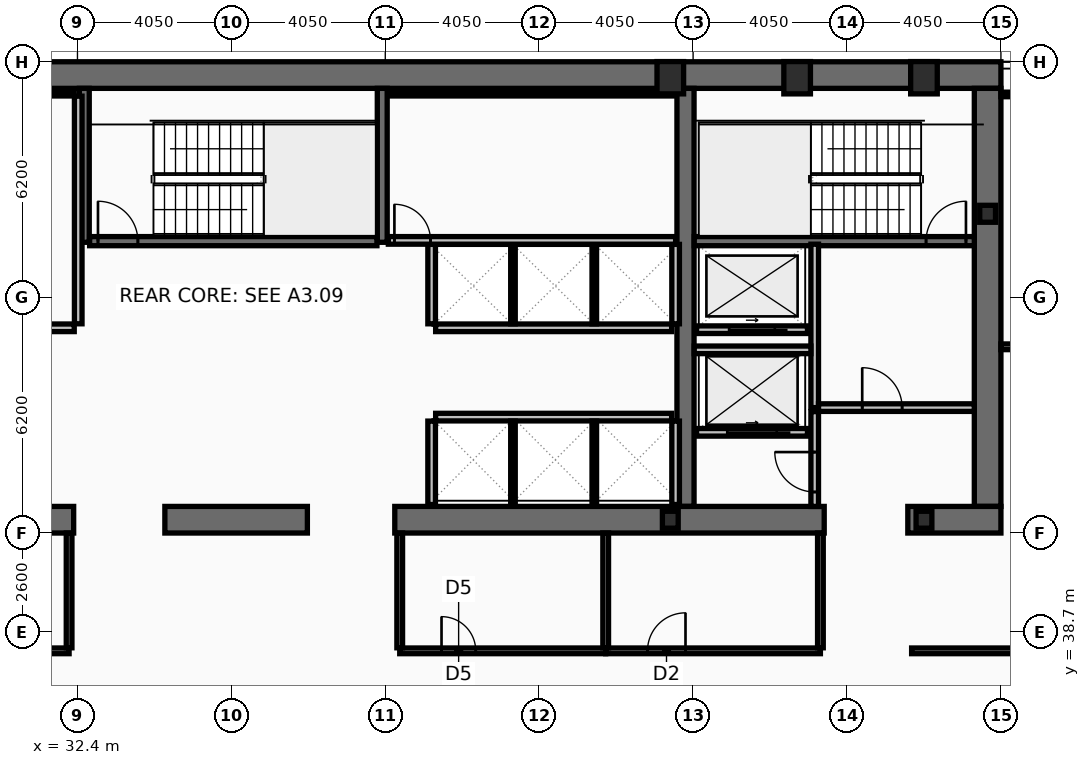
"""IFC4 building model, lengths in metres.
Left out: names, types, materials, properties, quantities, classifications, styles, units other than length and angle.
Written with IfcOpenShell. Run it as: python <this file> out.ifc"""

import sys

from ifc_helpers import new_model, si_unit, direction, frame, frame_2d, origin, origin_2d, place, context, subcontext, project, spatial, rectangle, hollow_rectangle, i_section, extrude, element, fill, save


model = new_model("IFC4")
c1 = context("Model", 3, precision=1e-05, world=origin(), true_north=direction((0.0, 1.0)))
c2 = subcontext(c1, "Body", "Model", "MODEL_VIEW")
j1 = project(units=[si_unit("LENGTHUNIT", "METRE"), si_unit("PLANEANGLEUNIT", "RADIAN")], contexts=[c1])
p1 = place(None, origin())
s1 = spatial("IfcSite", under=j1, at=p1, CompositionType="ELEMENT")
p2 = place(p1, origin())
s2 = spatial("IfcBuilding", under=s1, at=p2, CompositionType="ELEMENT")
p3 = place(p2, frame((0.0, 0.0, 161.4)))
s3 = spatial("IfcBuildingStorey", under=s2, at=p3, CompositionType="ELEMENT", Elevation=161.4)
p4 = place(p3, frame((16.2, 53.35, 0.0), z_axis=(0.0, 0.0, 1.0), x_axis=(1.0, 0.0, 0.0)))
e1 = element("IfcWall", 1, at=p4, inside=s3, PredefinedType="SHEAR", context=c2, shape_type="SweptSolid", body=[
    extrude(rectangle(XDim=40.5, YDim=0.7, at=frame_2d((20.25, 0.0))), origin(), (0.0, 0.0, 1.0), 3.44),
])
p5 = place(p3, frame((56.35, 53.0, 0.0), z_axis=(0.0, 0.0, 1.0), x_axis=(0.0, -1.0, 0.0)))
e2 = element("IfcWall", 2, at=p5, inside=s3, PredefinedType="SHEAR", context=c2, shape_type="SweptSolid", body=[
    extrude(rectangle(XDim=11.0, YDim=0.7, at=frame_2d((5.5, 0.0))), origin(), (0.0, 0.0, 1.0), 3.44),
])
p6 = place(p3, frame((48.4, 42.0, 0.0), z_axis=(0.0, 0.0, 1.0), x_axis=(0.0, 1.0, 0.0)))
e3 = element("IfcWall", 3, at=p6, inside=s3, PredefinedType="SHEAR", context=c2, shape_type="SweptSolid", body=[
    extrude(rectangle(XDim=11.0, YDim=0.45, at=frame_2d((5.5, 0.0))), origin(), (0.0, 0.0, 1.0), 3.44),
])
p7 = place(p3, frame((32.3, 41.65, 0.0), z_axis=(0.0, 0.0, 1.0), x_axis=(-1.0, 0.0, 0.0)))
e4 = element("IfcWall", 4, at=p7, inside=s3, PredefinedType="SHEAR", context=c2, shape_type="SweptSolid", body=[
    extrude(rectangle(XDim=11.45, YDim=0.7, at=frame_2d((5.725, 0.0))), origin(), (0.0, 0.0, 1.0), 3.44),
])
p8 = place(p3, frame((38.45, 41.65, 0.0), z_axis=(0.0, 0.0, 1.0), x_axis=(-1.0, 0.0, 0.0)))
e5 = element("IfcWall", 5, at=p8, inside=s3, PredefinedType="SHEAR", context=c2, shape_type="SweptSolid", body=[
    extrude(rectangle(XDim=3.75, YDim=0.7, at=frame_2d((1.875, 0.0))), origin(), (0.0, 0.0, 1.0), 3.44),
])
p9 = place(p3, frame((52.05, 41.65, 0.0), z_axis=(0.0, 0.0, 1.0), x_axis=(-1.0, 0.0, 0.0)))
e6 = element("IfcWall", 6, at=p9, inside=s3, PredefinedType="SHEAR", context=c2, shape_type="SweptSolid", body=[
    extrude(rectangle(XDim=11.3, YDim=0.7, at=frame_2d((5.65, 0.0))), origin(), (0.0, 0.0, 1.0), 3.44),
])
p10 = place(p3, frame((56.7, 41.65, 0.0), z_axis=(0.0, 0.0, 1.0), x_axis=(-1.0, 0.0, 0.0)))
e7 = element("IfcWall", 7, at=p10, inside=s3, PredefinedType="SHEAR", context=c2, shape_type="SweptSolid", body=[
    extrude(rectangle(XDim=2.45, YDim=0.7, at=frame_2d((1.225, 0.0))), origin(), (0.0, 0.0, 1.0), 3.44),
])
for number, where, z_axis, x_axis in (
    (8, (32.58, 48.95, 0.0), (0.0, 0.0, 1.0), (0.0, 1.0, 0.0)),
    (9, (40.42, 48.95, 0.0), (0.0, 0.0, 1.0), (0.0, 1.0, 0.0)),
):
    element("IfcWall", number, at=place(p3, frame(where, z_axis=z_axis, x_axis=x_axis)), inside=s3, PredefinedType="SHEAR", context=c2, shape_type="SweptSolid", body=[
        extrude(rectangle(XDim=4.05, YDim=0.26, at=frame_2d((2.025, 0.0))), origin(), (0.0, 0.0, 1.0), 3.44),
    ])
p11 = place(p3, frame((48.63, 48.98, 0.0), z_axis=(0.0, 0.0, 1.0), x_axis=(1.0, 0.0, 0.0)))
e10 = element("IfcWall", 10, at=p11, inside=s3, PredefinedType="SHEAR", context=c2, shape_type="SweptSolid", body=[
    extrude(rectangle(XDim=7.37, YDim=0.24, at=frame_2d((3.685, 0.0))), origin(), (0.0, 0.0, 1.0), 3.44),
])
p12 = place(p11, frame((6.1, 0.0, 0.0)))
e11 = element("IfcOpeningElement", 11, at=p12, cuts=e10, PredefinedType="OPENING", context=c2, shape_type="SweptSolid", body=[
    extrude(rectangle(XDim=1.05, YDim=2.15, at=frame_2d((0.525, 1.075))), frame((0.0, 0.13, 0.0), z_axis=(0.0, -1.0, 0.0), x_axis=(1.0, 0.0, 0.0)), (0.0, 0.0, 1.0), 0.26),
])
p13 = place(p3, frame((32.72, 48.98, 0.0), z_axis=(0.0, 0.0, 1.0), x_axis=(1.0, 0.0, 0.0)))
e12 = element("IfcWall", 12, at=p13, inside=s3, PredefinedType="SHEAR", context=c2, shape_type="SweptSolid", body=[
    extrude(rectangle(XDim=7.56, YDim=0.24, at=frame_2d((3.78, 0.0))), origin(), (0.0, 0.0, 1.0), 3.44),
])
p14 = place(p13, frame((0.22, 0.0, 0.0)))
e13 = element("IfcOpeningElement", 13, at=p14, cuts=e12, PredefinedType="OPENING", context=c2, shape_type="SweptSolid", body=[
    extrude(rectangle(XDim=1.05, YDim=2.15, at=frame_2d((0.525, 1.075))), frame((0.0, 0.13, 0.0), z_axis=(0.0, -1.0, 0.0), x_axis=(1.0, 0.0, 0.0)), (0.0, 0.0, 1.0), 0.26),
])
for number, where, z_axis, x_axis in (
    (14, (48.0, 53.28, 0.0), (0.0, 0.0, 1.0), (1.0, 0.0, 0.0)),
    (15, (51.337, 53.28, 0.0), (0.0, 0.0, 1.0), (1.0, 0.0, 0.0)),
    (16, (54.675, 53.28, 0.0), (0.0, 0.0, 1.0), (1.0, 0.0, 0.0)),
):
    element("IfcColumn", number, at=place(p3, frame(where, z_axis=z_axis, x_axis=x_axis)), inside=s3, PredefinedType="COLUMN", context=c2, shape_type="SweptSolid", body=[
        extrude(hollow_rectangle(XDim=0.7, YDim=0.85, WallThickness=0.05, at=origin_2d()), origin(), (0.0, 0.0, 1.0), 3.6),
    ])
for number, where, z_axis, x_axis in (
    (17, (56.35, 49.7, 0.0), (0.0, 0.0, 1.0), (1.0, 0.0, 0.0)),
    (18, (48.0, 41.65, 0.0), (0.0, 0.0, 1.0), (1.0, 0.0, 0.0)),
    (19, (54.675, 41.65, 0.0), (0.0, 0.0, 1.0), (1.0, 0.0, 0.0)),
):
    element("IfcColumn", number, at=place(p3, frame(where, z_axis=z_axis, x_axis=x_axis)), inside=s3, PredefinedType="COLUMN", context=c2, shape_type="SweptSolid", body=[
        extrude(i_section(OverallWidth=0.416, OverallDepth=0.446, WebThickness=0.039, FlangeThickness=0.063, at=origin_2d()), origin(), (0.0, 0.0, 1.0), 3.6),
    ])
p15 = place(p3, frame((51.61, 43.95, 0.0), z_axis=(0.0, 0.0, 1.0), x_axis=(-1.0, 0.0, 0.0)))
e20 = element("IfcWall", 20, at=p15, inside=s3, PredefinedType="PARTITIONING", context=c2, shape_type="SweptSolid", body=[
    extrude(rectangle(XDim=2.92, YDim=0.2, at=frame_2d((1.46, 0.0))), origin(), (0.0, 0.0, 1.0), 3.44),
])
p16 = place(p15, frame((0.81, 0.0, 0.0)))
e21 = element("IfcOpeningElement", 21, at=p16, cuts=e20, PredefinedType="OPENING", context=c2, shape_type="SweptSolid", body=[
    extrude(rectangle(XDim=1.3, YDim=2.18, at=frame_2d((0.65, 1.09))), frame((0.0, 0.11, 0.0), z_axis=(0.0, -1.0, 0.0), x_axis=(1.0, 0.0, 0.0)), (0.0, 0.0, 1.0), 0.22),
])
p17 = place(p3, frame((51.61, 46.65, 0.0), z_axis=(0.0, 0.0, 1.0), x_axis=(-1.0, 0.0, 0.0)))
e22 = element("IfcWall", 22, at=p17, inside=s3, PredefinedType="PARTITIONING", context=c2, shape_type="SweptSolid", body=[
    extrude(rectangle(XDim=2.92, YDim=0.2, at=frame_2d((1.46, 0.0))), origin(), (0.0, 0.0, 1.0), 3.44),
])
p18 = place(p17, frame((0.86, 0.0, 0.0)))
e23 = element("IfcOpeningElement", 23, at=p18, cuts=e22, PredefinedType="OPENING", context=c2, shape_type="SweptSolid", body=[
    extrude(rectangle(XDim=1.2, YDim=2.18, at=frame_2d((0.6, 1.09))), frame((0.0, 0.11, 0.0), z_axis=(0.0, -1.0, 0.0), x_axis=(1.0, 0.0, 0.0)), (0.0, 0.0, 1.0), 0.22),
])
p19 = place(p3, frame((51.8, 44.6, 0.0), z_axis=(0.0, 0.0, 1.0), x_axis=(0.0, 1.0, 0.0)))
e24 = element("IfcWall", 24, at=p19, inside=s3, PredefinedType="PARTITIONING", context=c2, shape_type="SweptSolid", body=[
    extrude(rectangle(XDim=4.3, YDim=0.2, at=frame_2d((2.15, 0.0))), origin(), (0.0, 0.0, 1.0), 3.44),
])
p20 = place(p3, frame((51.9, 44.6, 0.0), z_axis=(0.0, 0.0, 1.0), x_axis=(1.0, 0.0, 0.0)))
e25 = element("IfcWall", 25, at=p20, inside=s3, PredefinedType="PARTITIONING", context=c2, shape_type="SweptSolid", body=[
    extrude(rectangle(XDim=4.1, YDim=0.2, at=frame_2d((2.05, 0.0))), origin(), (0.0, 0.0, 1.0), 3.44),
])
p21 = place(p20, frame((1.15, 0.0, 0.0)))
e26 = element("IfcOpeningElement", 26, at=p21, cuts=e25, PredefinedType="OPENING", context=c2, shape_type="SweptSolid", body=[
    extrude(rectangle(XDim=1.05, YDim=2.15, at=frame_2d((0.525, 1.075))), frame((0.0, 0.11, 0.0), z_axis=(0.0, -1.0, 0.0), x_axis=(1.0, 0.0, 0.0)), (0.0, 0.0, 1.0), 0.22),
])
p22 = place(p3, frame((48.63, 46.12, 0.0), z_axis=(0.0, 0.0, 1.0), x_axis=(1.0, 0.0, 0.0)))
e27 = element("IfcWall", 27, at=p22, inside=s3, PredefinedType="PARTITIONING", context=c2, shape_type="SweptSolid", body=[
    extrude(rectangle(XDim=3.07, YDim=0.2, at=frame_2d((1.535, 0.0))), origin(), (0.0, 0.0, 1.0), 3.44),
])
p23 = place(p3, frame((51.8, 42.0, 0.0), z_axis=(0.0, 0.0, 1.0), x_axis=(0.0, 1.0, 0.0)))
e28 = element("IfcWall", 28, at=p23, inside=s3, PredefinedType="PARTITIONING", context=c2, shape_type="SweptSolid", body=[
    extrude(rectangle(XDim=2.495, YDim=0.2, at=frame_2d((1.248, 0.0))), origin(), (0.0, 0.0, 1.0), 3.44),
])
p24 = place(p23, frame((0.38, 0.0, 0.0)))
e29 = element("IfcOpeningElement", 29, at=p24, cuts=e28, PredefinedType="OPENING", context=c2, shape_type="SweptSolid", body=[
    extrude(rectangle(XDim=1.05, YDim=2.15, at=frame_2d((0.525, 1.075))), frame((0.0, 0.11, 0.0), z_axis=(0.0, -1.0, 0.0), x_axis=(1.0, 0.0, 0.0)), (0.0, 0.0, 1.0), 0.22),
])
p25 = place(p3, frame((32.42, 46.805, 0.0), z_axis=(0.0, 0.0, 1.0), x_axis=(0.0, 1.0, 0.0)))
e30 = element("IfcWall", 30, at=p25, inside=s3, PredefinedType="PARTITIONING", context=c2, shape_type="SweptSolid", body=[
    extrude(rectangle(XDim=5.99, YDim=0.2, at=frame_2d((2.995, 0.0))), origin(), (0.0, 0.0, 1.0), 3.44),
])
p26 = place(p3, frame((24.805, 52.86, 0.0), z_axis=(0.0, 0.0, 1.0), x_axis=(1.0, 0.0, 0.0)))
e31 = element("IfcWall", 31, at=p26, inside=s3, PredefinedType="PARTITIONING", context=c2, shape_type="SweptSolid", body=[
    extrude(rectangle(XDim=7.51, YDim=0.12, at=frame_2d((3.755, 0.0))), origin(), (0.0, 0.0, 1.0), 3.44),
])
p27 = place(p3, frame((24.805, 46.7, 0.0), z_axis=(0.0, 0.0, 1.0), x_axis=(1.0, 0.0, 0.0)))
e32 = element("IfcWall", 32, at=p27, inside=s3, PredefinedType="PARTITIONING", context=c2, shape_type="SweptSolid", body=[
    extrude(rectangle(XDim=7.51, YDim=0.2, at=frame_2d((3.755, 0.0))), origin(), (0.0, 0.0, 1.0), 3.44),
])
p28 = place(p27, frame((0.55, 0.0, 0.0)))
e33 = element("IfcOpeningElement", 33, at=p28, cuts=e32, PredefinedType="OPENING", context=c2, shape_type="SweptSolid", body=[
    extrude(rectangle(XDim=0.95, YDim=2.1, at=frame_2d((0.475, 1.05))), frame((0.0, 0.11, 0.0), z_axis=(0.0, -1.0, 0.0), x_axis=(1.0, 0.0, 0.0)), (0.0, 0.0, 1.0), 0.22),
])
p29 = place(p27, frame((3.784, 0.0, 0.0)))
e34 = element("IfcOpeningElement", 34, at=p29, cuts=e32, PredefinedType="OPENING", context=c2, shape_type="SweptSolid", body=[
    extrude(rectangle(XDim=0.95, YDim=2.1, at=frame_2d((0.475, 1.05))), frame((0.0, 0.11, 0.0), z_axis=(0.0, -1.0, 0.0), x_axis=(1.0, 0.0, 0.0)), (0.0, 0.0, 1.0), 0.22),
])
p30 = place(p3, frame((41.825, 46.7, 0.0), z_axis=(0.0, 0.0, 1.0), x_axis=(1.0, 0.0, 0.0)))
e35 = element("IfcWall", 35, at=p30, inside=s3, PredefinedType="PARTITIONING", context=c2, shape_type="SweptSolid", body=[
    extrude(rectangle(XDim=6.21, YDim=0.2, at=frame_2d((3.105, 0.0))), origin(), (0.0, 0.0, 1.0), 3.44),
])
for number, where, z_axis, x_axis in (
    (36, (41.72, 46.805, 0.0), (0.0, 0.0, 1.0), (0.0, 1.0, 0.0)),
    (37, (48.14, 46.805, 0.0), (0.0, 0.0, 1.0), (0.0, 1.0, 0.0)),
):
    element("IfcWall", number, at=place(p3, frame(where, z_axis=z_axis, x_axis=x_axis)), inside=s3, PredefinedType="PARTITIONING", context=c2, shape_type="SweptSolid", body=[
        extrude(rectangle(XDim=2.09, YDim=0.2, at=frame_2d((1.045, 0.0))), origin(), (0.0, 0.0, 1.0), 3.44),
    ])
for number, where, z_axis, x_axis in (
    (38, (43.86, 46.805, 0.0), (0.0, 0.0, 1.0), (0.0, 1.0, 0.0)),
    (39, (46.0, 46.805, 0.0), (0.0, 0.0, 1.0), (0.0, 1.0, 0.0)),
):
    element("IfcWall", number, at=place(p3, frame(where, z_axis=z_axis, x_axis=x_axis)), inside=s3, PredefinedType="PARTITIONING", context=c2, shape_type="SweptSolid", body=[
        extrude(rectangle(XDim=2.09, YDim=0.12, at=frame_2d((1.045, 0.0))), origin(), (0.0, 0.0, 1.0), 3.44),
    ])
p31 = place(p3, frame((41.825, 44.35, 0.0), z_axis=(0.0, 0.0, 1.0), x_axis=(1.0, 0.0, 0.0)))
e40 = element("IfcWall", 40, at=p31, inside=s3, PredefinedType="PARTITIONING", context=c2, shape_type="SweptSolid", body=[
    extrude(rectangle(XDim=6.21, YDim=0.2, at=frame_2d((3.105, 0.0))), origin(), (0.0, 0.0, 1.0), 3.44),
])
for number, where, z_axis, x_axis in (
    (41, (41.72, 42.05, 0.0), (0.0, 0.0, 1.0), (0.0, 1.0, 0.0)),
    (42, (48.14, 42.05, 0.0), (0.0, 0.0, 1.0), (0.0, 1.0, 0.0)),
):
    element("IfcWall", number, at=place(p3, frame(where, z_axis=z_axis, x_axis=x_axis)), inside=s3, PredefinedType="PARTITIONING", context=c2, shape_type="SweptSolid", body=[
        extrude(rectangle(XDim=2.195, YDim=0.2, at=frame_2d((1.098, 0.0))), origin(), (0.0, 0.0, 1.0), 3.44),
    ])
for number, where, z_axis, x_axis in (
    (43, (43.86, 42.05, 0.0), (0.0, 0.0, 1.0), (0.0, 1.0, 0.0)),
    (44, (46.0, 42.05, 0.0), (0.0, 0.0, 1.0), (0.0, 1.0, 0.0)),
):
    element("IfcWall", number, at=place(p3, frame(where, z_axis=z_axis, x_axis=x_axis)), inside=s3, PredefinedType="PARTITIONING", context=c2, shape_type="SweptSolid", body=[
        extrude(rectangle(XDim=2.195, YDim=0.12, at=frame_2d((1.098, 0.0))), origin(), (0.0, 0.0, 1.0), 3.44),
    ])
p32 = place(p3, frame((40.58, 52.86, 0.0), z_axis=(0.0, 0.0, 1.0), x_axis=(1.0, 0.0, 0.0)))
e45 = element("IfcWall", 45, at=p32, inside=s3, PredefinedType="PARTITIONING", context=c2, shape_type="SweptSolid", body=[
    extrude(rectangle(XDim=7.56, YDim=0.12, at=frame_2d((3.78, 0.0))), origin(), (0.0, 0.0, 1.0), 3.44),
])
p33 = place(p3, frame((40.58, 49.0, 0.0), z_axis=(0.0, 0.0, 1.0), x_axis=(1.0, 0.0, 0.0)))
e46 = element("IfcWall", 46, at=p33, inside=s3, PredefinedType="PARTITIONING", context=c2, shape_type="SweptSolid", body=[
    extrude(rectangle(XDim=7.56, YDim=0.2, at=frame_2d((3.78, 0.0))), origin(), (0.0, 0.0, 1.0), 3.44),
])
p34 = place(p33, frame((0.16, 0.0, 0.0)))
e47 = element("IfcOpeningElement", 47, at=p34, cuts=e46, PredefinedType="OPENING", context=c2, shape_type="SweptSolid", body=[
    extrude(rectangle(XDim=0.95, YDim=2.1, at=frame_2d((0.475, 1.05))), frame((0.0, 0.11, 0.0), z_axis=(0.0, -1.0, 0.0), x_axis=(1.0, 0.0, 0.0)), (0.0, 0.0, 1.0), 0.22),
])
p35 = place(p3, frame((29.2, 38.2, 0.0), z_axis=(0.0, 0.0, 1.0), x_axis=(1.0, 0.0, 0.0)))
e48 = element("IfcWall", 48, at=p35, inside=s3, PredefinedType="PARTITIONING", context=c2, shape_type="SweptSolid", body=[
    extrude(rectangle(XDim=2.98, YDim=0.15, at=frame_2d((1.49, 0.0))), origin(), (0.0, 0.0, 1.0), 2.73),
])
p36 = place(p35, frame((0.7, 0.0, 0.0)))
e49 = element("IfcOpeningElement", 49, at=p36, cuts=e48, PredefinedType="OPENING", context=c2, shape_type="SweptSolid", body=[
    extrude(rectangle(XDim=0.95, YDim=2.05, at=frame_2d((0.475, 1.025))), frame((0.0, 0.085, 0.0), z_axis=(0.0, -1.0, 0.0), x_axis=(1.0, 0.0, 0.0)), (0.0, 0.0, 1.0), 0.17),
])
p37 = place(p3, frame((32.18, 38.28, 0.0), z_axis=(0.0, 0.0, 1.0), x_axis=(0.0, 1.0, 0.0)))
e50 = element("IfcWall", 50, at=p37, inside=s3, PredefinedType="PARTITIONING", context=c2, shape_type="SweptSolid", body=[
    extrude(rectangle(XDim=3.02, YDim=0.15, at=frame_2d((1.51, 0.0))), origin(), (0.0, 0.0, 1.0), 3.44),
])
p38 = place(p3, frame((40.88, 38.2, 0.0), z_axis=(0.0, 0.0, 1.0), x_axis=(1.0, 0.0, 0.0)))
e51 = element("IfcWall", 51, at=p38, inside=s3, PredefinedType="PARTITIONING", context=c2, shape_type="SweptSolid", body=[
    extrude(rectangle(XDim=5.42, YDim=0.15, at=frame_2d((2.71, 0.0))), origin(), (0.0, 0.0, 1.0), 2.73),
])
p39 = place(p38, frame((1.1, 0.0, 0.0)))
e52 = element("IfcOpeningElement", 52, at=p39, cuts=e51, PredefinedType="OPENING", context=c2, shape_type="SweptSolid", body=[
    extrude(rectangle(XDim=0.9, YDim=2.05, at=frame_2d((0.45, 1.025))), frame((0.0, 0.085, 0.0), z_axis=(0.0, -1.0, 0.0), x_axis=(1.0, 0.0, 0.0)), (0.0, 0.0, 1.0), 0.17),
])
p40 = place(p3, frame((46.3, 38.2, 0.0), z_axis=(0.0, 0.0, 1.0), x_axis=(1.0, 0.0, 0.0)))
e53 = element("IfcWall", 53, at=p40, inside=s3, PredefinedType="PARTITIONING", context=c2, shape_type="SweptSolid", body=[
    extrude(rectangle(XDim=5.65, YDim=0.15, at=frame_2d((2.825, 0.0))), origin(), (0.0, 0.0, 1.0), 2.73),
])
p41 = place(p40, frame((1.1, 0.0, 0.0)))
e54 = element("IfcOpeningElement", 54, at=p41, cuts=e53, PredefinedType="OPENING", context=c2, shape_type="SweptSolid", body=[
    extrude(rectangle(XDim=1.0, YDim=2.05, at=frame_2d((0.5, 1.025))), frame((0.0, 0.085, 0.0), z_axis=(0.0, -1.0, 0.0), x_axis=(1.0, 0.0, 0.0)), (0.0, 0.0, 1.0), 0.17),
])
for number, where, z_axis, x_axis in (
    (55, (40.88, 38.28, 0.0), (0.0, 0.0, 1.0), (0.0, 1.0, 0.0)),
    (56, (46.3, 38.28, 0.0), (0.0, 0.0, 1.0), (0.0, 1.0, 0.0)),
    (57, (51.95, 38.28, 0.0), (0.0, 0.0, 1.0), (0.0, 1.0, 0.0)),
):
    element("IfcWall", number, at=place(p3, frame(where, z_axis=z_axis, x_axis=x_axis)), inside=s3, PredefinedType="PARTITIONING", context=c2, shape_type="SweptSolid", body=[
        extrude(rectangle(XDim=3.02, YDim=0.15, at=frame_2d((1.51, 0.0))), origin(), (0.0, 0.0, 1.0), 3.44),
    ])
p42 = place(p3, frame((54.35, 38.2, 0.0), z_axis=(0.0, 0.0, 1.0), x_axis=(1.0, 0.0, 0.0)))
e58 = element("IfcWall", 58, at=p42, inside=s3, PredefinedType="PARTITIONING", context=c2, shape_type="SweptSolid", body=[
    extrude(rectangle(XDim=12.52, YDim=0.15, at=frame_2d((6.26, 0.0))), origin(), (0.0, 0.0, 1.0), 2.73),
])
p43 = place(p42, frame((3.25, 0.0, 0.0)))
e59 = element("IfcOpeningElement", 59, at=p43, cuts=e58, PredefinedType="OPENING", context=c2, shape_type="SweptSolid", body=[
    extrude(rectangle(XDim=0.95, YDim=2.05, at=frame_2d((0.475, 1.025))), frame((0.0, 0.085, 0.0), z_axis=(0.0, -1.0, 0.0), x_axis=(1.0, 0.0, 0.0)), (0.0, 0.0, 1.0), 0.17),
])
p44 = place(p3, frame((56.7, 46.2, 0.0), z_axis=(0.0, 0.0, 1.0), x_axis=(1.0, 0.0, 0.0)))
e60 = element("IfcWall", 60, at=p44, inside=s3, PredefinedType="PARTITIONING", context=c2, shape_type="SweptSolid", body=[
    extrude(rectangle(XDim=10.105, YDim=0.15, at=frame_2d((5.052, 0.0))), origin(), (0.0, 0.0, 1.0), 2.83),
])
p45 = place(p44, frame((0.9, 0.0, 0.0)))
e61 = element("IfcOpeningElement", 61, at=p45, cuts=e60, PredefinedType="OPENING", context=c2, shape_type="SweptSolid", body=[
    extrude(rectangle(XDim=0.9, YDim=2.05, at=frame_2d((0.45, 1.025))), frame((0.0, 0.085, 0.0), z_axis=(0.0, -1.0, 0.0), x_axis=(1.0, 0.0, 0.0)), (0.0, 0.0, 1.0), 0.17),
])
p46 = place(p3, frame((56.7, 52.84, 0.0), z_axis=(0.0, 0.0, 1.0), x_axis=(1.0, 0.0, 0.0)))
e62 = element("IfcWall", 62, at=p46, inside=s3, PredefinedType="PARTITIONING", context=c2, shape_type="SweptSolid", body=[
    extrude(rectangle(XDim=10.105, YDim=0.12, at=frame_2d((5.052, 0.0))), origin(), (0.0, 0.0, 1.0), 3.44),
])
p47 = place(p12, origin())
e63 = element("IfcDoor", 63, at=p47, inside=s3, OperationType="SINGLE_SWING_RIGHT", PredefinedType="DOOR", context=c2, shape_type="SweptSolid", body=[
    extrude(rectangle(XDim=1.05, YDim=2.15, at=frame_2d((0.525, 1.075))), frame((0.0, 0.025, 0.0), z_axis=(0.0, -1.0, 0.0), x_axis=(1.0, 0.0, 0.0)), (0.0, 0.0, 1.0), 0.05),
])
fill(e11, e63)
p48 = place(p14, origin())
e64 = element("IfcDoor", 64, at=p48, inside=s3, OperationType="SINGLE_SWING_LEFT", PredefinedType="DOOR", context=c2, shape_type="SweptSolid", body=[
    extrude(rectangle(XDim=1.05, YDim=2.15, at=frame_2d((0.525, 1.075))), frame((0.0, 0.025, 0.0), z_axis=(0.0, -1.0, 0.0), x_axis=(1.0, 0.0, 0.0)), (0.0, 0.0, 1.0), 0.05),
])
fill(e13, e64)
p49 = place(p16, origin())
e65 = element("IfcDoor", 65, at=p49, inside=s3, OperationType="SLIDING_TO_LEFT", PredefinedType="DOOR", context=c2, shape_type="SweptSolid", body=[
    extrude(rectangle(XDim=1.3, YDim=2.18, at=frame_2d((0.65, 1.09))), frame((0.0, 0.025, 0.0), z_axis=(0.0, -1.0, 0.0), x_axis=(1.0, 0.0, 0.0)), (0.0, 0.0, 1.0), 0.05),
])
fill(e21, e65)
p50 = place(p18, origin())
e66 = element("IfcDoor", 66, at=p50, inside=s3, OperationType="SLIDING_TO_LEFT", PredefinedType="DOOR", context=c2, shape_type="SweptSolid", body=[
    extrude(rectangle(XDim=1.2, YDim=2.18, at=frame_2d((0.6, 1.09))), frame((0.0, 0.025, 0.0), z_axis=(0.0, -1.0, 0.0), x_axis=(1.0, 0.0, 0.0)), (0.0, 0.0, 1.0), 0.05),
])
fill(e23, e66)
p51 = place(p21, origin())
e67 = element("IfcDoor", 67, at=p51, inside=s3, OperationType="SINGLE_SWING_LEFT", PredefinedType="DOOR", context=c2, shape_type="SweptSolid", body=[
    extrude(rectangle(XDim=1.05, YDim=2.15, at=frame_2d((0.525, 1.075))), frame((0.0, 0.025, 0.0), z_axis=(0.0, -1.0, 0.0), x_axis=(1.0, 0.0, 0.0)), (0.0, 0.0, 1.0), 0.05),
])
fill(e26, e67)
p52 = place(p24, origin())
e68 = element("IfcDoor", 68, at=p52, inside=s3, OperationType="SINGLE_SWING_RIGHT", PredefinedType="DOOR", context=c2, shape_type="SweptSolid", body=[
    extrude(rectangle(XDim=1.05, YDim=2.15, at=frame_2d((0.525, 1.075))), frame((0.0, 0.025, 0.0), z_axis=(0.0, -1.0, 0.0), x_axis=(1.0, 0.0, 0.0)), (0.0, 0.0, 1.0), 0.05),
])
fill(e29, e68)
p53 = place(p34, origin())
e69 = element("IfcDoor", 69, at=p53, inside=s3, OperationType="SINGLE_SWING_LEFT", PredefinedType="DOOR", context=c2, shape_type="SweptSolid", body=[
    extrude(rectangle(XDim=0.95, YDim=2.1, at=frame_2d((0.475, 1.05))), frame((0.0, 0.025, 0.0), z_axis=(0.0, -1.0, 0.0), x_axis=(1.0, 0.0, 0.0)), (0.0, 0.0, 1.0), 0.05),
])
fill(e47, e69)
p54 = place(p39, origin())
e70 = element("IfcDoor", 70, at=p54, inside=s3, OperationType="SINGLE_SWING_LEFT", PredefinedType="DOOR", context=c2, shape_type="SweptSolid", body=[
    extrude(rectangle(XDim=0.9, YDim=2.05, at=frame_2d((0.45, 1.025))), frame((0.0, 0.025, 0.0), z_axis=(0.0, -1.0, 0.0), x_axis=(1.0, 0.0, 0.0)), (0.0, 0.0, 1.0), 0.05),
])
fill(e52, e70)
p55 = place(p41, origin())
e71 = element("IfcDoor", 71, at=p55, inside=s3, OperationType="SINGLE_SWING_RIGHT", PredefinedType="DOOR", context=c2, shape_type="SweptSolid", body=[
    extrude(rectangle(XDim=1.0, YDim=2.05, at=frame_2d((0.5, 1.025))), frame((0.0, 0.025, 0.0), z_axis=(0.0, -1.0, 0.0), x_axis=(1.0, 0.0, 0.0)), (0.0, 0.0, 1.0), 0.05),
])
fill(e54, e71)
save(model, sys.argv[1])
